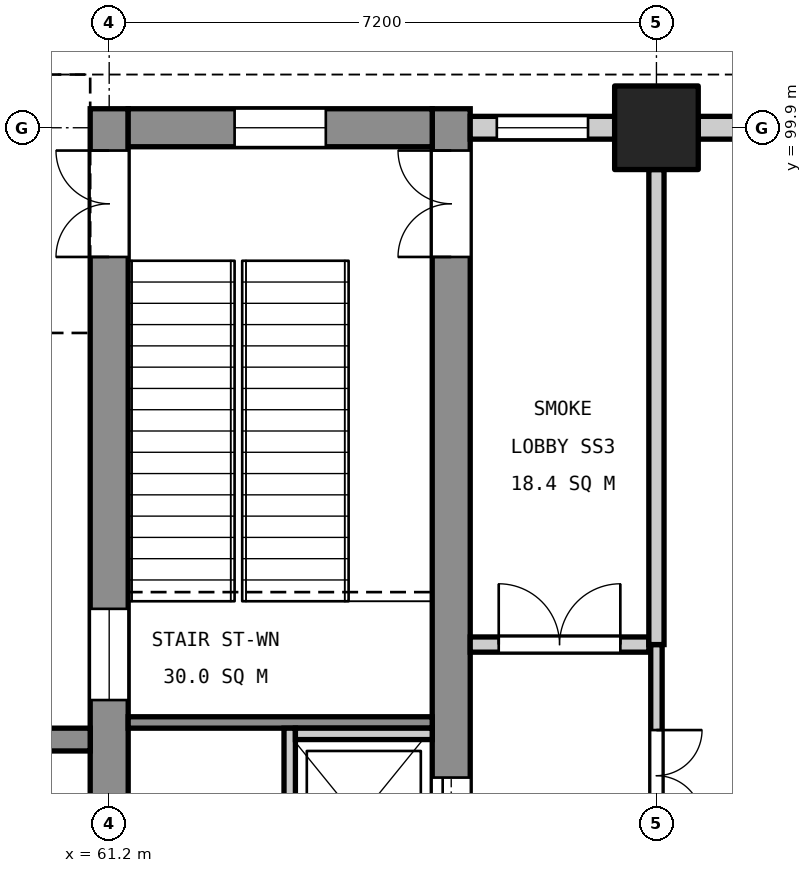
"""IFC4 building model, lengths in metres.
Left out: names, types, materials, properties, quantities, classifications, styles, units other than length and angle.
Written with IfcOpenShell. Run it as: python <this file> out.ifc"""

import sys

from ifc_helpers import new_model, si_unit, direction, frame, frame_2d, origin, origin_2d, place, context, subcontext, project, spatial, rectangle, extrude, element, fill, save


model = new_model("IFC4")
c1 = context("Model", 3, precision=1e-05, world=origin(), true_north=direction((0.0, 1.0)))
c2 = subcontext(c1, "Body", "Model", "MODEL_VIEW")
j1 = project(units=[si_unit("LENGTHUNIT", "METRE"), si_unit("PLANEANGLEUNIT", "RADIAN")], contexts=[c1])
p1 = place(None, origin())
s1 = spatial("IfcSite", under=j1, at=p1, CompositionType="ELEMENT")
p2 = place(p1, origin())
s2 = spatial("IfcBuilding", under=s1, at=p2, CompositionType="ELEMENT")
p3 = place(p2, origin())
s3 = spatial("IfcBuildingStorey", under=s2, at=p3, CompositionType="ELEMENT", Elevation=0.0)
p4 = place(p3, frame((68.4, 99.9, 0.0), z_axis=(0.0, 0.0, 1.0), x_axis=(1.0, 0.0, 0.0)))
e1 = element("IfcColumn", 1, at=p4, inside=s3, PredefinedType="COLUMN", context=c2, shape_type="SweptSolid", body=[
    extrude(rectangle(XDim=1.1, YDim=1.1, at=origin_2d()), origin(), (0.0, 0.0, 1.0), 6.0),
])
p5 = place(p3, frame((61.2, 88.85, 0.0), z_axis=(0.0, 0.0, 1.0), x_axis=(0.0, 1.0, 0.0)))
e2 = element("IfcWall", 2, at=p5, inside=s3, PredefinedType="SHEAR", context=c2, shape_type="SweptSolid", body=[
    extrude(rectangle(XDim=11.3, YDim=0.5, at=frame_2d((5.65, 0.0))), origin(), (0.0, 0.0, 1.0), 5.7),
])
p6 = place(p5, frame((9.35, 0.0, 0.0)))
e3 = element("IfcOpeningElement", 3, at=p6, cuts=e2, PredefinedType="OPENING", context=c2, shape_type="SweptSolid", body=[
    extrude(rectangle(XDim=1.4, YDim=2.1, at=frame_2d((0.7, 1.05))), frame((0.0, 0.26, 0.0), z_axis=(0.0, -1.0, 0.0), x_axis=(1.0, 0.0, 0.0)), (0.0, 0.0, 1.0), 0.52),
])
p7 = place(p5, frame((3.52, 0.0, 3.4)))
e4 = element("IfcOpeningElement", 4, at=p7, cuts=e2, PredefinedType="OPENING", context=c2, shape_type="SweptSolid", body=[
    extrude(rectangle(XDim=1.2, YDim=0.9, at=frame_2d((0.6, 0.45))), frame((0.0, 0.26, 0.0), z_axis=(0.0, -1.0, 0.0), x_axis=(1.0, 0.0, 0.0)), (0.0, 0.0, 1.0), 0.52),
])
p8 = place(p3, frame((65.7, 88.85, 0.0), z_axis=(0.0, 0.0, 1.0), x_axis=(0.0, 1.0, 0.0)))
e5 = element("IfcWall", 5, at=p8, inside=s3, PredefinedType="SHEAR", context=c2, shape_type="SweptSolid", body=[
    extrude(rectangle(XDim=11.3, YDim=0.5, at=frame_2d((5.65, 0.0))), origin(), (0.0, 0.0, 1.0), 5.7),
])
p9 = place(p8, frame((9.35, 0.0, 0.0)))
e6 = element("IfcOpeningElement", 6, at=p9, cuts=e5, PredefinedType="OPENING", context=c2, shape_type="SweptSolid", body=[
    extrude(rectangle(XDim=1.4, YDim=2.1, at=frame_2d((0.7, 1.05))), frame((0.0, 0.26, 0.0), z_axis=(0.0, -1.0, 0.0), x_axis=(1.0, 0.0, 0.0)), (0.0, 0.0, 1.0), 0.52),
])
p10 = place(p8, frame((1.4, 0.0, 0.0)))
e7 = element("IfcOpeningElement", 7, at=p10, cuts=e5, PredefinedType="OPENING", context=c2, shape_type="SweptSolid", body=[
    extrude(rectangle(XDim=1.1, YDim=2.1, at=frame_2d((0.55, 1.05))), frame((0.0, 0.26, 0.0), z_axis=(0.0, -1.0, 0.0), x_axis=(1.0, 0.0, 0.0)), (0.0, 0.0, 1.0), 0.52),
])
p11 = place(p3, frame((61.45, 99.9, 0.0), z_axis=(0.0, 0.0, 1.0), x_axis=(1.0, 0.0, 0.0)))
e8 = element("IfcWall", 8, at=p11, inside=s3, PredefinedType="SHEAR", context=c2, shape_type="SweptSolid", body=[
    extrude(rectangle(XDim=4.0, YDim=0.5, at=frame_2d((2.0, 0.0))), origin(), (0.0, 0.0, 1.0), 5.7),
])
p12 = place(p11, frame((1.4, 0.0, 3.4)))
e9 = element("IfcOpeningElement", 9, at=p12, cuts=e8, PredefinedType="OPENING", context=c2, shape_type="SweptSolid", body=[
    extrude(rectangle(XDim=1.2, YDim=0.9, at=frame_2d((0.6, 0.45))), frame((0.0, 0.26, 0.0), z_axis=(0.0, -1.0, 0.0), x_axis=(1.0, 0.0, 0.0)), (0.0, 0.0, 1.0), 0.52),
])
p13 = place(p3, frame((60.95, 91.85, 0.0), z_axis=(0.0, 0.0, 1.0), x_axis=(-1.0, 0.0, 0.0)))
e10 = element("IfcWall", 10, at=p13, inside=s3, PredefinedType="SHEAR", context=c2, shape_type="SweptSolid", body=[
    extrude(rectangle(XDim=1.25, YDim=0.3, at=frame_2d((0.625, 0.0))), origin(), (0.0, 0.0, 1.0), 6.0),
])
p14 = place(p3, frame((61.45, 92.075, 0.0), z_axis=(0.0, 0.0, 1.0), x_axis=(1.0, 0.0, 0.0)))
e11 = element("IfcWall", 11, at=p14, inside=s3, PredefinedType="SOLIDWALL", context=c2, shape_type="SweptSolid", body=[
    extrude(rectangle(XDim=4.0, YDim=0.15, at=frame_2d((2.0, 0.0))), origin(), (0.0, 0.0, 1.0), 5.7),
])
p15 = place(p3, frame((63.575, 92.0, 0.0), z_axis=(0.0, 0.0, 1.0), x_axis=(0.0, -1.0, 0.0)))
e12 = element("IfcWall", 12, at=p15, inside=s3, PredefinedType="SOLIDWALL", context=c2, shape_type="SweptSolid", body=[
    extrude(rectangle(XDim=2.65, YDim=0.15, at=frame_2d((1.325, 0.0))), origin(), (0.0, 0.0, 1.0), 6.0),
])
p16 = place(p3, frame((63.65, 91.925, 0.0), z_axis=(0.0, 0.0, 1.0), x_axis=(1.0, 0.0, 0.0)))
e13 = element("IfcWall", 13, at=p16, inside=s3, PredefinedType="SOLIDWALL", context=c2, shape_type="SweptSolid", body=[
    extrude(rectangle(XDim=1.8, YDim=0.15, at=frame_2d((0.9, 0.0))), origin(), (0.0, 0.0, 1.0), 6.0),
])
p17 = place(p3, frame((65.95, 99.9, 0.0), z_axis=(0.0, 0.0, 1.0), x_axis=(1.0, 0.0, 0.0)))
e14 = element("IfcWall", 14, at=p17, inside=s3, PredefinedType="STANDARD", context=c2, shape_type="SweptSolid", body=[
    extrude(rectangle(XDim=1.9, YDim=0.3, at=frame_2d((0.95, 0.0))), origin(), (0.0, 0.0, 1.0), 4.9),
])
p18 = place(p17, frame((0.35, 0.0, 0.9)))
e15 = element("IfcOpeningElement", 15, at=p18, cuts=e14, PredefinedType="OPENING", context=c2, shape_type="SweptSolid", body=[
    extrude(rectangle(XDim=1.2, YDim=2.4, at=frame_2d((0.6, 1.2))), frame((0.0, 0.16, 0.0), z_axis=(0.0, -1.0, 0.0), x_axis=(1.0, 0.0, 0.0)), (0.0, 0.0, 1.0), 0.32),
])
p19 = place(p3, frame((68.95, 99.9, 0.0), z_axis=(0.0, 0.0, 1.0), x_axis=(1.0, 0.0, 0.0)))
e16 = element("IfcWall", 16, at=p19, inside=s3, PredefinedType="STANDARD", context=c2, shape_type="SweptSolid", body=[
    extrude(rectangle(XDim=9.7, YDim=0.3, at=frame_2d((4.85, 0.0))), origin(), (0.0, 0.0, 1.0), 4.9),
])
p20 = place(p19, frame((0.625, 0.0, 0.9)))
e17 = element("IfcOpeningElement", 17, at=p20, cuts=e16, PredefinedType="OPENING", context=c2, shape_type="SweptSolid", body=[
    extrude(rectangle(XDim=1.8, YDim=3.0, at=frame_2d((0.9, 1.5))), frame((0.0, 0.16, 0.0), z_axis=(0.0, -1.0, 0.0), x_axis=(1.0, 0.0, 0.0)), (0.0, 0.0, 1.0), 0.32),
])
p21 = place(p19, frame((3.95, 0.0, 0.9)))
e18 = element("IfcOpeningElement", 18, at=p21, cuts=e16, PredefinedType="OPENING", context=c2, shape_type="SweptSolid", body=[
    extrude(rectangle(XDim=1.8, YDim=3.0, at=frame_2d((0.9, 1.5))), frame((0.0, 0.16, 0.0), z_axis=(0.0, -1.0, 0.0), x_axis=(1.0, 0.0, 0.0)), (0.0, 0.0, 1.0), 0.32),
])
p22 = place(p19, frame((7.275, 0.0, 0.9)))
e19 = element("IfcOpeningElement", 19, at=p22, cuts=e16, PredefinedType="OPENING", context=c2, shape_type="SweptSolid", body=[
    extrude(rectangle(XDim=1.8, YDim=3.0, at=frame_2d((0.9, 1.5))), frame((0.0, 0.16, 0.0), z_axis=(0.0, -1.0, 0.0), x_axis=(1.0, 0.0, 0.0)), (0.0, 0.0, 1.0), 0.32),
])
p23 = place(p3, frame((65.95, 93.1, 0.0), z_axis=(0.0, 0.0, 1.0), x_axis=(1.0, 0.0, 0.0)))
e20 = element("IfcWall", 20, at=p23, inside=s3, PredefinedType="PARTITIONING", context=c2, shape_type="SweptSolid", body=[
    extrude(rectangle(XDim=2.35, YDim=0.2, at=frame_2d((1.175, 0.0))), origin(), (0.0, 0.0, 1.0), 4.6),
])
p24 = place(p23, frame((0.375, 0.0, 0.0)))
e21 = element("IfcOpeningElement", 21, at=p24, cuts=e20, PredefinedType="OPENING", context=c2, shape_type="SweptSolid", body=[
    extrude(rectangle(XDim=1.6, YDim=2.1, at=frame_2d((0.8, 1.05))), frame((0.0, 0.11, 0.0), z_axis=(0.0, -1.0, 0.0), x_axis=(1.0, 0.0, 0.0)), (0.0, 0.0, 1.0), 0.22),
])
p25 = place(p3, frame((68.4, 89.65, 0.0), z_axis=(0.0, 0.0, 1.0), x_axis=(0.0, 1.0, 0.0)))
e22 = element("IfcWall", 22, at=p25, inside=s3, PredefinedType="PARTITIONING", context=c2, shape_type="SweptSolid", body=[
    extrude(rectangle(XDim=3.45, YDim=0.15, at=frame_2d((1.725, 0.0))), origin(), (0.0, 0.0, 1.0), 4.6),
])
p26 = place(p25, frame((1.125, 0.0, 0.0)))
e23 = element("IfcOpeningElement", 23, at=p26, cuts=e22, PredefinedType="OPENING", context=c2, shape_type="SweptSolid", body=[
    extrude(rectangle(XDim=1.2, YDim=2.1, at=frame_2d((0.6, 1.05))), frame((0.0, 0.085, 0.0), z_axis=(0.0, -1.0, 0.0), x_axis=(1.0, 0.0, 0.0)), (0.0, 0.0, 1.0), 0.17),
])
p27 = place(p3, frame((68.4, 93.1, 0.0), z_axis=(0.0, 0.0, 1.0), x_axis=(0.0, 1.0, 0.0)))
e24 = element("IfcWall", 24, at=p27, inside=s3, PredefinedType="PARTITIONING", context=c2, shape_type="SweptSolid", body=[
    extrude(rectangle(XDim=6.25, YDim=0.2, at=frame_2d((3.125, 0.0))), origin(), (0.0, 0.0, 1.0), 4.6),
])
p28 = place(p9, origin())
e25 = element("IfcDoor", 25, at=p28, inside=s3, OperationType="DOUBLE_DOOR_SINGLE_SWING", PredefinedType="DOOR", context=c2, shape_type="SweptSolid", body=[
    extrude(rectangle(XDim=1.4, YDim=2.1, at=frame_2d((0.7, 1.05))), frame((0.0, 0.025, 0.0), z_axis=(0.0, -1.0, 0.0), x_axis=(1.0, 0.0, 0.0)), (0.0, 0.0, 1.0), 0.05),
])
fill(e6, e25)
p29 = place(p6, origin())
e26 = element("IfcDoor", 26, at=p29, inside=s3, OperationType="DOUBLE_DOOR_SINGLE_SWING", PredefinedType="DOOR", context=c2, shape_type="SweptSolid", body=[
    extrude(rectangle(XDim=1.4, YDim=2.1, at=frame_2d((0.7, 1.05))), frame((0.0, 0.025, 0.0), z_axis=(0.0, -1.0, 0.0), x_axis=(1.0, 0.0, 0.0)), (0.0, 0.0, 1.0), 0.05),
])
fill(e3, e26)
p30 = place(p10, origin())
e27 = element("IfcDoor", 27, at=p30, inside=s3, OperationType="SLIDING_TO_LEFT", PredefinedType="DOOR", context=c2, shape_type="SweptSolid", body=[
    extrude(rectangle(XDim=1.1, YDim=2.1, at=frame_2d((0.55, 1.05))), frame((0.0, 0.025, 0.0), z_axis=(0.0, -1.0, 0.0), x_axis=(1.0, 0.0, 0.0)), (0.0, 0.0, 1.0), 0.05),
])
fill(e7, e27)
p31 = place(p18, origin())
e28 = element("IfcWindow", 28, at=p31, inside=s3, PartitioningType="SINGLE_PANEL", PredefinedType="WINDOW", context=c2, shape_type="SweptSolid", body=[
    extrude(rectangle(XDim=1.2, YDim=2.4, at=frame_2d((0.6, 1.2))), frame((0.0, 0.03, 0.0), z_axis=(0.0, -1.0, 0.0), x_axis=(1.0, 0.0, 0.0)), (0.0, 0.0, 1.0), 0.06),
])
fill(e15, e28)
p32 = place(p7, origin())
e29 = element("IfcWindow", 29, at=p32, inside=s3, PartitioningType="SINGLE_PANEL", PredefinedType="WINDOW", context=c2, shape_type="SweptSolid", body=[
    extrude(rectangle(XDim=1.2, YDim=0.9, at=frame_2d((0.6, 0.45))), frame((0.0, 0.03, 0.0), z_axis=(0.0, -1.0, 0.0), x_axis=(1.0, 0.0, 0.0)), (0.0, 0.0, 1.0), 0.06),
])
fill(e4, e29)
p33 = place(p12, origin())
e30 = element("IfcWindow", 30, at=p33, inside=s3, PartitioningType="SINGLE_PANEL", PredefinedType="WINDOW", context=c2, shape_type="SweptSolid", body=[
    extrude(rectangle(XDim=1.2, YDim=0.9, at=frame_2d((0.6, 0.45))), frame((0.0, 0.03, 0.0), z_axis=(0.0, -1.0, 0.0), x_axis=(1.0, 0.0, 0.0)), (0.0, 0.0, 1.0), 0.06),
])
fill(e9, e30)
p34 = place(p26, frame((1.2, 0.0, 0.0), z_axis=(0.0, 0.0, 1.0), x_axis=(-1.0, 0.0, 0.0)))
e31 = element("IfcDoor", 31, at=p34, inside=s3, OperationType="DOUBLE_DOOR_SINGLE_SWING", PredefinedType="DOOR", context=c2, shape_type="SweptSolid", body=[
    extrude(rectangle(XDim=1.2, YDim=2.1, at=frame_2d((0.6, 1.05))), frame((0.0, 0.025, 0.0), z_axis=(0.0, -1.0, 0.0), x_axis=(1.0, 0.0, 0.0)), (0.0, 0.0, 1.0), 0.05),
])
fill(e23, e31)
p35 = place(p24, origin())
e32 = element("IfcDoor", 32, at=p35, inside=s3, OperationType="DOUBLE_DOOR_SINGLE_SWING", PredefinedType="DOOR", context=c2, shape_type="SweptSolid", body=[
    extrude(rectangle(XDim=1.6, YDim=2.1, at=frame_2d((0.8, 1.05))), frame((0.0, 0.025, 0.0), z_axis=(0.0, -1.0, 0.0), x_axis=(1.0, 0.0, 0.0)), (0.0, 0.0, 1.0), 0.05),
])
fill(e21, e32)
save(model, sys.argv[1])
